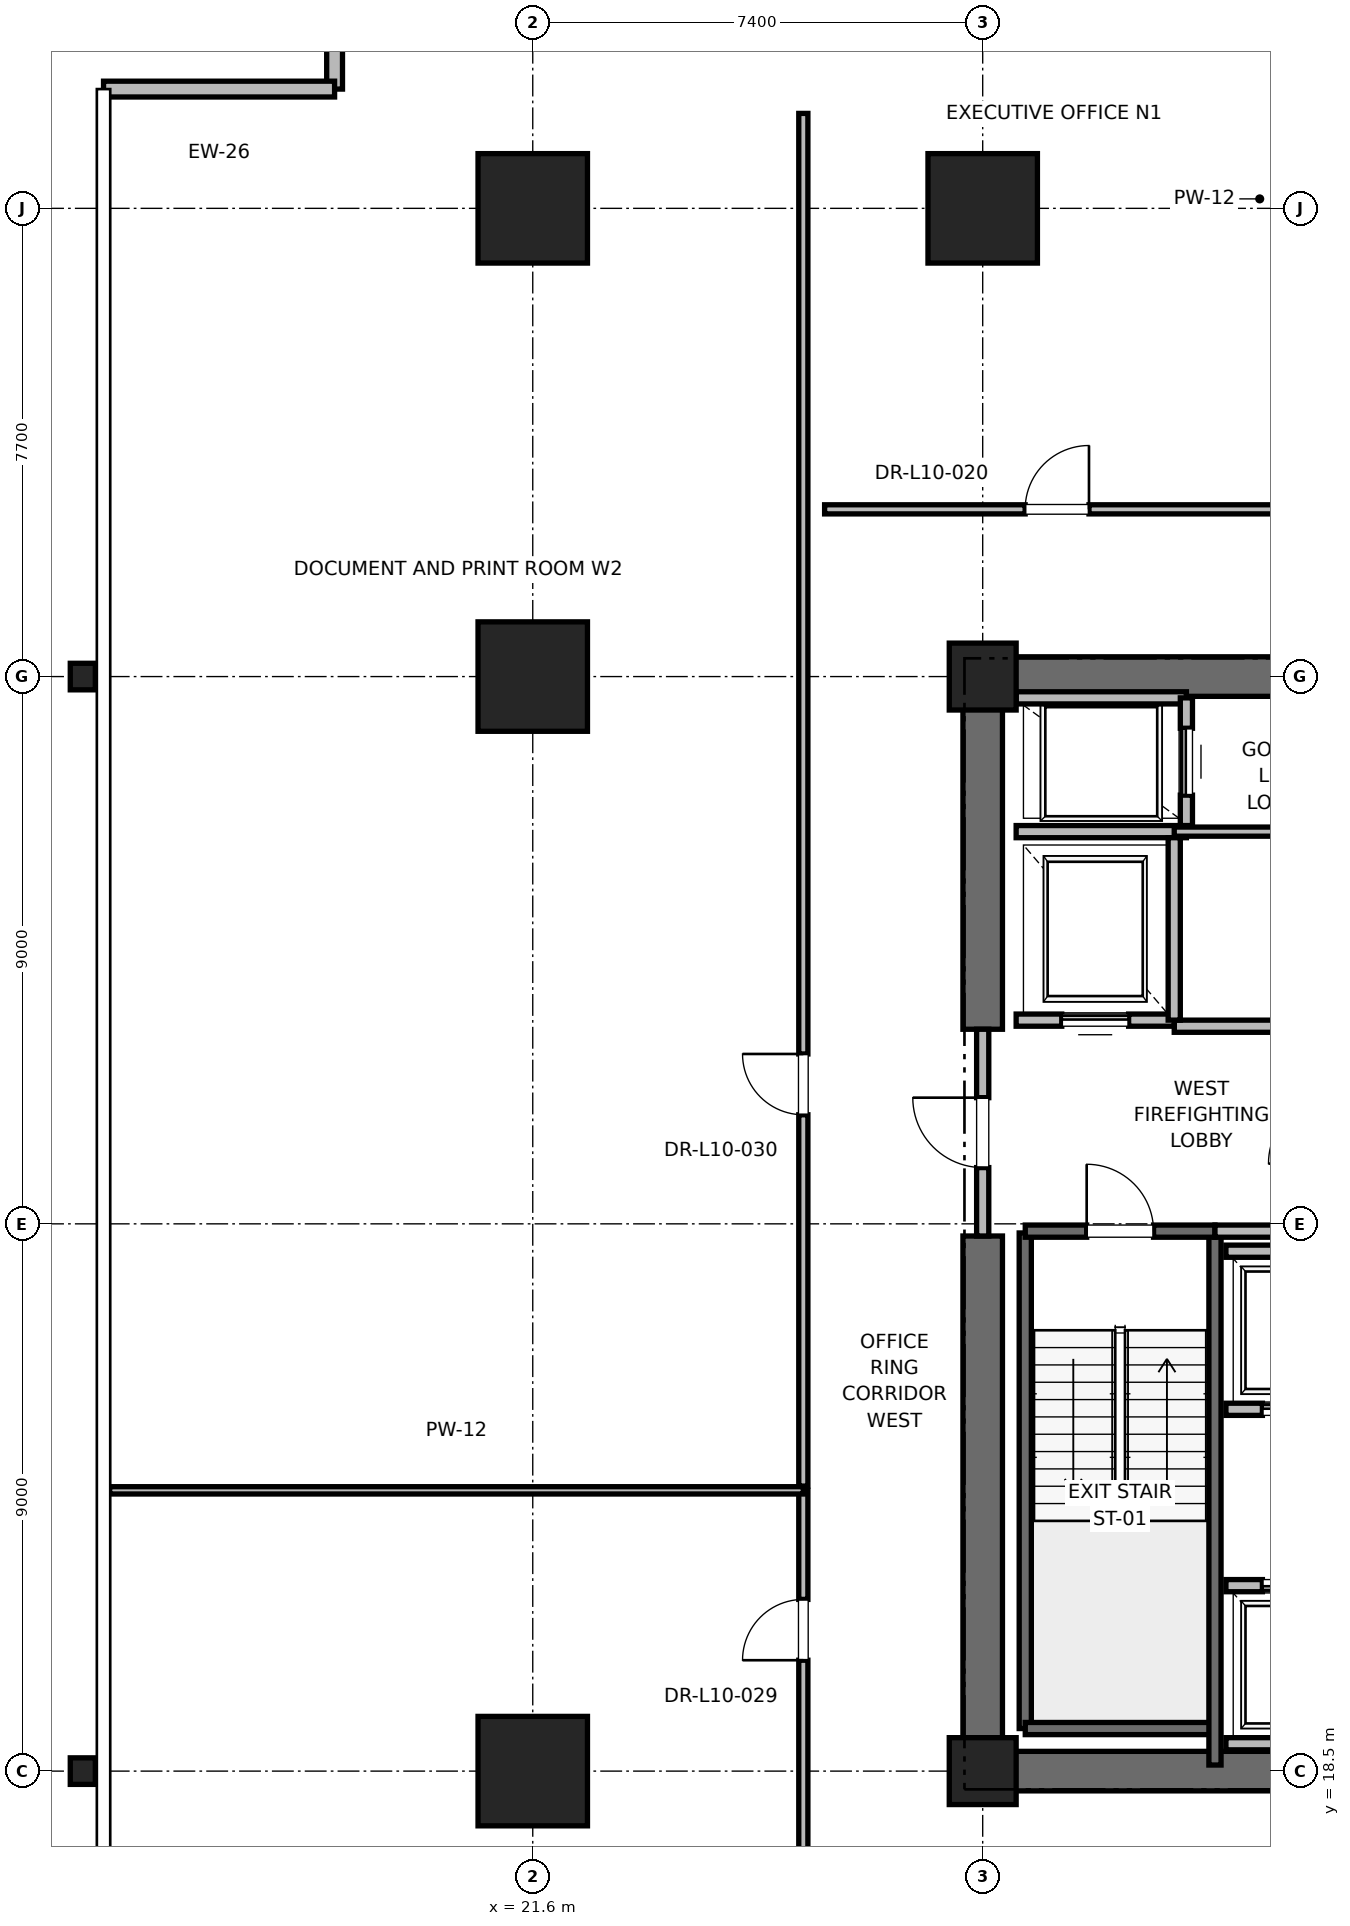
"""IFC4 building model, lengths in metres.
Left out: names, types, materials, properties, quantities, classifications, styles, units other than length and angle.
Written with IfcOpenShell. Run it as: python <this file> out.ifc"""

import sys

from ifc_helpers import new_model, si_unit, direction, frame, frame_2d, origin, origin_2d, place, context, subcontext, project, spatial, rectangle, i_section, extrude, element, fill, save


model = new_model("IFC4")
c1 = context("Model", 3, precision=1e-05, world=origin(), true_north=direction((0.0, 1.0)))
c2 = subcontext(c1, "Body", "Model", "MODEL_VIEW")
j1 = project(units=[si_unit("LENGTHUNIT", "METRE"), si_unit("PLANEANGLEUNIT", "RADIAN")], contexts=[c1])
p1 = place(None, origin())
s1 = spatial("IfcSite", under=j1, at=p1, CompositionType="ELEMENT")
p2 = place(p1, origin())
s2 = spatial("IfcBuilding", under=s1, at=p2, CompositionType="ELEMENT")
p3 = place(p2, frame((0.0, 0.0, 47.6)))
s3 = spatial("IfcBuildingStorey", under=s2, at=p3, CompositionType="ELEMENT", Elevation=47.6)
for number, where, z_axis, x_axis in (
    (1, (29.0, 44.2, 0.0), (0.0, 0.0, 1.0), (1.0, 0.0, 0.0)),
    (2, (21.6, 18.5, 0.0), (0.0, 0.0, 1.0), (1.0, 0.0, 0.0)),
    (3, (21.6, 36.5, 0.0), (0.0, 0.0, 1.0), (1.0, 0.0, 0.0)),
    (4, (21.6, 44.2, 0.0), (0.0, 0.0, 1.0), (1.0, 0.0, 0.0)),
):
    element("IfcColumn", number, at=place(p3, frame(where, z_axis=z_axis, x_axis=x_axis)), inside=s3, PredefinedType="COLUMN", context=c2, shape_type="SweptSolid", body=[
        extrude(rectangle(XDim=1.8, YDim=1.8, at=origin_2d()), origin(), (0.0, 0.0, 1.0), 4.0),
    ])
for number, where, z_axis, x_axis in (
    (5, (14.2, 18.5, 0.0), (0.0, 0.0, 1.0), (1.0, 0.0, 0.0)),
    (6, (14.2, 36.5, 0.0), (0.0, 0.0, 1.0), (1.0, 0.0, 0.0)),
):
    element("IfcColumn", number, at=place(p3, frame(where, z_axis=z_axis, x_axis=x_axis)), inside=s3, PredefinedType="COLUMN", context=c2, shape_type="SweptSolid", body=[
        extrude(i_section(OverallWidth=0.412, OverallDepth=0.437, WebThickness=0.036, FlangeThickness=0.058, FilletRadius=0.015, at=origin_2d()), origin(), (0.0, 0.0, 1.0), 4.0),
    ])
for number, where, z_axis, x_axis in (
    (7, (29.0, 18.5, 0.0), (0.0, 0.0, 1.0), (1.0, 0.0, 0.0)),
    (8, (29.0, 36.5, 0.0), (0.0, 0.0, 1.0), (1.0, 0.0, 0.0)),
):
    element("IfcColumn", number, at=place(p3, frame(where, z_axis=z_axis, x_axis=x_axis)), inside=s3, PredefinedType="PILASTER", context=c2, shape_type="SweptSolid", body=[
        extrude(rectangle(XDim=1.1, YDim=1.1, at=origin_2d()), origin(), (0.0, 0.0, 1.0), 4.0),
    ])
p4 = place(p3, frame((29.0, 18.5, 0.0), z_axis=(0.0, 0.0, 1.0), x_axis=(1.0, 0.0, 0.0)))
e9 = element("IfcWall", 9, at=p4, inside=s3, PredefinedType="SHEAR", context=c2, shape_type="SweptSolid", body=[
    extrude(rectangle(XDim=9.2, YDim=0.65, at=frame_2d((4.6, 0.0))), origin(), (0.0, 0.0, 1.0), 3.76),
])
p5 = place(p3, frame((29.0, 36.5, 0.0), z_axis=(0.0, 0.0, 1.0), x_axis=(1.0, 0.0, 0.0)))
e10 = element("IfcWall", 10, at=p5, inside=s3, PredefinedType="SHEAR", context=c2, shape_type="SweptSolid", body=[
    extrude(rectangle(XDim=5.8, YDim=0.65, at=frame_2d((2.9, 0.0))), origin(), (0.0, 0.0, 1.0), 3.76),
])
p6 = place(p3, frame((29.0, 18.5, 0.0), z_axis=(0.0, 0.0, 1.0), x_axis=(0.0, 1.0, 0.0)))
e11 = element("IfcWall", 11, at=p6, inside=s3, PredefinedType="SHEAR", context=c2, shape_type="SweptSolid", body=[
    extrude(rectangle(XDim=8.8, YDim=0.65, at=frame_2d((4.4, 0.0))), origin(), (0.0, 0.0, 1.0), 3.76),
])
p7 = place(p3, frame((29.0, 30.7, 0.0), z_axis=(0.0, 0.0, 1.0), x_axis=(0.0, 1.0, 0.0)))
e12 = element("IfcWall", 12, at=p7, inside=s3, PredefinedType="SHEAR", context=c2, shape_type="SweptSolid", body=[
    extrude(rectangle(XDim=5.8, YDim=0.65, at=frame_2d((2.9, 0.0))), origin(), (0.0, 0.0, 1.0), 3.76),
])
p8 = place(p3, frame((18.341, 49.561, 0.0), z_axis=(0.0, 0.0, 1.0), x_axis=(0.0, -1.0, 0.0)))
e13 = element("IfcWall", 13, at=p8, inside=s3, PredefinedType="PARAPET", context=c2, shape_type="SweptSolid", body=[
    extrude(rectangle(XDim=3.4, YDim=0.26, at=frame_2d((1.7, 0.0))), origin(), (0.0, 0.0, 1.0), 3.76),
])
p9 = place(p8, frame((0.8, 0.0, 0.85)))
e14 = element("IfcOpeningElement", 14, at=p9, cuts=e13, PredefinedType="OPENING", context=c2, shape_type="SweptSolid", body=[
    extrude(rectangle(XDim=1.8, YDim=2.2, at=frame_2d((0.9, 1.1))), frame((0.0, 0.13, 0.0), z_axis=(0.0, -1.0, 0.0), x_axis=(1.0, 0.0, 0.0)), (0.0, 0.0, 1.0), 0.26),
])
p10 = place(p3, frame((18.341, 46.161, 0.0), z_axis=(0.0, 0.0, 1.0), x_axis=(-1.0, 0.0, 0.0)))
e15 = element("IfcWall", 15, at=p10, inside=s3, PredefinedType="PARAPET", context=c2, shape_type="SweptSolid", body=[
    extrude(rectangle(XDim=3.8, YDim=0.26, at=frame_2d((1.9, 0.0))), origin(), (0.0, 0.0, 1.0), 3.76),
])
p11 = place(p3, frame((29.7, 19.2, 0.0), z_axis=(0.0, 0.0, 1.0), x_axis=(0.0, 1.0, 0.0)))
e16 = element("IfcWall", 16, at=p11, inside=s3, PredefinedType="SOLIDWALL", context=c2, shape_type="SweptSolid", body=[
    extrude(rectangle(XDim=8.15, YDim=0.2, at=frame_2d((4.075, 0.0))), origin(), (0.0, 0.0, 1.0), 3.76),
])
p12 = place(p3, frame((29.7, 19.2, 0.0), z_axis=(0.0, 0.0, 1.0), x_axis=(1.0, 0.0, 0.0)))
e17 = element("IfcWall", 17, at=p12, inside=s3, PredefinedType="SOLIDWALL", context=c2, shape_type="SweptSolid", body=[
    extrude(rectangle(XDim=3.12, YDim=0.2, at=frame_2d((1.56, 0.0))), origin(), (0.0, 0.0, 1.0), 3.76),
])
p13 = place(p3, frame((32.82, 18.6, 0.0), z_axis=(0.0, 0.0, 1.0), x_axis=(0.0, 1.0, 0.0)))
e18 = element("IfcWall", 18, at=p13, inside=s3, PredefinedType="SOLIDWALL", context=c2, shape_type="SweptSolid", body=[
    extrude(rectangle(XDim=8.78, YDim=0.2, at=frame_2d((4.39, 0.0))), origin(), (0.0, 0.0, 1.0), 3.76),
])
p14 = place(p3, frame((29.7, 27.38, 0.0), z_axis=(0.0, 0.0, 1.0), x_axis=(1.0, 0.0, 0.0)))
e19 = element("IfcWall", 19, at=p14, inside=s3, PredefinedType="SOLIDWALL", context=c2, shape_type="SweptSolid", body=[
    extrude(rectangle(XDim=3.12, YDim=0.2, at=frame_2d((1.56, 0.0))), origin(), (0.0, 0.0, 1.0), 3.76),
])
p15 = place(p14, frame((1.01, 0.0, 0.0)))
e20 = element("IfcOpeningElement", 20, at=p15, cuts=e19, PredefinedType="OPENING", context=c2, shape_type="SweptSolid", body=[
    extrude(rectangle(XDim=1.1, YDim=2.15, at=frame_2d((0.55, 1.075))), frame((0.0, 0.1, 0.0), z_axis=(0.0, -1.0, 0.0), x_axis=(1.0, 0.0, 0.0)), (0.0, 0.0, 1.0), 0.2),
])
p16 = place(p3, frame((29.0, 27.3, 0.0), z_axis=(0.0, 0.0, 1.0), x_axis=(0.0, 1.0, 0.0)))
e21 = element("IfcWall", 21, at=p16, inside=s3, PredefinedType="PARTITIONING", context=c2, shape_type="SweptSolid", body=[
    extrude(rectangle(XDim=3.4, YDim=0.2, at=frame_2d((1.7, 0.0))), origin(), (0.0, 0.0, 1.0), 2.54),
])
p17 = place(p16, frame((1.125, 0.0, 0.0)))
e22 = element("IfcOpeningElement", 22, at=p17, cuts=e21, PredefinedType="OPENING", context=c2, shape_type="SweptSolid", body=[
    extrude(rectangle(XDim=1.15, YDim=2.2, at=frame_2d((0.575, 1.1))), frame((0.0, 0.1, 0.0), z_axis=(0.0, -1.0, 0.0), x_axis=(1.0, 0.0, 0.0)), (0.0, 0.0, 1.0), 0.2),
])
p18 = place(p3, frame((32.82, 27.38, 0.0), z_axis=(0.0, 0.0, 1.0), x_axis=(1.0, 0.0, 0.0)))
e23 = element("IfcWall", 23, at=p18, inside=s3, PredefinedType="PARTITIONING", context=c2, shape_type="SweptSolid", body=[
    extrude(rectangle(XDim=5.62, YDim=0.2, at=frame_2d((2.81, 0.0))), origin(), (0.0, 0.0, 1.0), 3.76),
])
p19 = place(p3, frame((32.15, 30.75, 0.0), z_axis=(0.0, 0.0, 1.0), x_axis=(1.0, 0.0, 0.0)))
e24 = element("IfcWall", 24, at=p19, inside=s3, PredefinedType="PARTITIONING", context=c2, shape_type="SweptSolid", body=[
    extrude(rectangle(XDim=3.13, YDim=0.2, at=frame_2d((1.565, 0.0))), origin(), (0.0, 0.0, 1.0), 3.76),
])
p20 = place(p3, frame((29.55, 30.85, 0.0), z_axis=(0.0, 0.0, 1.0), x_axis=(1.0, 0.0, 0.0)))
e25 = element("IfcWall", 25, at=p20, inside=s3, PredefinedType="SOLIDWALL", context=c2, shape_type="SweptSolid", body=[
    extrude(rectangle(XDim=2.6, YDim=0.2, at=frame_2d((1.3, 0.0))), origin(), (0.0, 0.0, 1.0), 2.54),
])
p21 = place(p20, frame((0.75, 0.0, 0.0)))
e26 = element("IfcOpeningElement", 26, at=p21, cuts=e25, PredefinedType="OPENING", context=c2, shape_type="SweptSolid", body=[
    extrude(rectangle(XDim=1.1, YDim=2.2, at=frame_2d((0.55, 1.1))), frame((0.0, 0.1, 0.0), z_axis=(0.0, -1.0, 0.0), x_axis=(1.0, 0.0, 0.0)), (0.0, 0.0, 1.0), 0.2),
])
p22 = place(p3, frame((29.55, 33.95, 0.0), z_axis=(0.0, 0.0, 1.0), x_axis=(1.0, 0.0, 0.0)))
e27 = element("IfcWall", 27, at=p22, inside=s3, PredefinedType="SOLIDWALL", context=c2, shape_type="SweptSolid", body=[
    extrude(rectangle(XDim=2.8, YDim=0.2, at=frame_2d((1.4, 0.0))), origin(), (0.0, 0.0, 1.0), 3.76),
])
p23 = place(p3, frame((32.15, 30.85, 0.0), z_axis=(0.0, 0.0, 1.0), x_axis=(0.0, 1.0, 0.0)))
e28 = element("IfcWall", 28, at=p23, inside=s3, PredefinedType="SOLIDWALL", context=c2, shape_type="SweptSolid", body=[
    extrude(rectangle(XDim=3.0, YDim=0.2, at=frame_2d((1.5, 0.0))), origin(), (0.0, 0.0, 1.0), 3.76),
])
p24 = place(p3, frame((32.35, 36.15, 0.0), z_axis=(0.0, 0.0, 1.0), x_axis=(-1.0, 0.0, 0.0)))
e29 = element("IfcWall", 29, at=p24, inside=s3, PredefinedType="SOLIDWALL", context=c2, shape_type="SweptSolid", body=[
    extrude(rectangle(XDim=2.8, YDim=0.2, at=frame_2d((1.4, 0.0))), origin(), (0.0, 0.0, 1.0), 2.889),
])
p25 = place(p3, frame((32.35, 34.05, 0.0), z_axis=(0.0, 0.0, 1.0), x_axis=(0.0, 1.0, 0.0)))
e30 = element("IfcWall", 30, at=p25, inside=s3, PredefinedType="SOLIDWALL", context=c2, shape_type="SweptSolid", body=[
    extrude(rectangle(XDim=2.1, YDim=0.2, at=frame_2d((1.05, 0.0))), origin(), (0.0, 0.0, 1.0), 3.76),
])
p26 = place(p25, frame((0.5, 0.0, 0.0)))
e31 = element("IfcOpeningElement", 31, at=p26, cuts=e30, PredefinedType="OPENING", context=c2, shape_type="SweptSolid", body=[
    extrude(rectangle(XDim=1.1, YDim=2.2, at=frame_2d((0.55, 1.1))), frame((0.0, 0.1, 0.0), z_axis=(0.0, -1.0, 0.0), x_axis=(1.0, 0.0, 0.0)), (0.0, 0.0, 1.0), 0.2),
])
p27 = place(p3, frame((33.0, 18.95, 0.0), z_axis=(0.0, 0.0, 1.0), x_axis=(1.0, 0.0, 0.0)))
e32 = element("IfcWall", 32, at=p27, inside=s3, PredefinedType="SOLIDWALL", context=c2, shape_type="SweptSolid", body=[
    extrude(rectangle(XDim=2.3, YDim=0.2, at=frame_2d((1.15, 0.0))), origin(), (0.0, 0.0, 1.0), 3.76),
])
p28 = place(p3, frame((35.3, 21.55, 0.0), z_axis=(0.0, 0.0, 1.0), x_axis=(-1.0, 0.0, 0.0)))
e33 = element("IfcWall", 33, at=p28, inside=s3, PredefinedType="SOLIDWALL", context=c2, shape_type="SweptSolid", body=[
    extrude(rectangle(XDim=2.3, YDim=0.2, at=frame_2d((1.15, 0.0))), origin(), (0.0, 0.0, 1.0), 3.76),
])
p29 = place(p28, frame((0.6, 0.0, 0.0)))
e34 = element("IfcOpeningElement", 34, at=p29, cuts=e33, PredefinedType="OPENING", context=c2, shape_type="SweptSolid", body=[
    extrude(rectangle(XDim=1.1, YDim=2.2, at=frame_2d((0.55, 1.1))), frame((0.0, 0.1, 0.0), z_axis=(0.0, -1.0, 0.0), x_axis=(1.0, 0.0, 0.0)), (0.0, 0.0, 1.0), 0.2),
])
p30 = place(p3, frame((33.0, 24.45, 0.0), z_axis=(0.0, 0.0, 1.0), x_axis=(1.0, 0.0, 0.0)))
e35 = element("IfcWall", 35, at=p30, inside=s3, PredefinedType="SOLIDWALL", context=c2, shape_type="SweptSolid", body=[
    extrude(rectangle(XDim=2.3, YDim=0.2, at=frame_2d((1.15, 0.0))), origin(), (0.0, 0.0, 1.0), 3.76),
])
p31 = place(p30, frame((0.6, 0.0, 0.0)))
e36 = element("IfcOpeningElement", 36, at=p31, cuts=e35, PredefinedType="OPENING", context=c2, shape_type="SweptSolid", body=[
    extrude(rectangle(XDim=1.1, YDim=2.2, at=frame_2d((0.55, 1.1))), frame((0.0, 0.1, 0.0), z_axis=(0.0, -1.0, 0.0), x_axis=(1.0, 0.0, 0.0)), (0.0, 0.0, 1.0), 0.2),
])
p32 = place(p3, frame((35.3, 27.05, 0.0), z_axis=(0.0, 0.0, 1.0), x_axis=(-1.0, 0.0, 0.0)))
e37 = element("IfcWall", 37, at=p32, inside=s3, PredefinedType="SOLIDWALL", context=c2, shape_type="SweptSolid", body=[
    extrude(rectangle(XDim=2.3, YDim=0.2, at=frame_2d((1.15, 0.0))), origin(), (0.0, 0.0, 1.0), 3.76),
])
p33 = place(p3, frame((32.15, 33.95, 0.0), z_axis=(0.0, 0.0, 1.0), x_axis=(1.0, 0.0, 0.0)))
e38 = element("IfcWall", 38, at=p33, inside=s3, PredefinedType="PARTITIONING", context=c2, shape_type="SweptSolid", body=[
    extrude(rectangle(XDim=3.13, YDim=0.15, at=frame_2d((1.565, 0.0))), origin(), (0.0, 0.0, 1.0), 2.85),
])
p34 = place(p3, frame((26.4, 39.25, 0.0), z_axis=(0.0, 0.0, 1.0), x_axis=(1.0, 0.0, 0.0)))
e39 = element("IfcWall", 39, at=p34, inside=s3, PredefinedType="PARTITIONING", context=c2, shape_type="SweptSolid", body=[
    extrude(rectangle(XDim=7.616, YDim=0.15, at=frame_2d((3.808, 0.0))), origin(), (0.0, 0.0, 1.0), 2.85),
])
p35 = place(p34, frame((3.298, 0.0, 0.0)))
e40 = element("IfcOpeningElement", 40, at=p35, cuts=e39, PredefinedType="OPENING", context=c2, shape_type="SweptSolid", body=[
    extrude(rectangle(XDim=1.05, YDim=2.2, at=frame_2d((0.525, 1.1))), frame((0.0, 0.075, 0.0), z_axis=(0.0, -1.0, 0.0), x_axis=(1.0, 0.0, 0.0)), (0.0, 0.0, 1.0), 0.15),
])
p36 = place(p3, frame((26.05, 9.239, 0.0), z_axis=(0.0, 0.0, 1.0), x_axis=(0.0, 1.0, 0.0)))
e41 = element("IfcWall", 41, at=p36, inside=s3, PredefinedType="PARTITIONING", context=c2, shape_type="SweptSolid", body=[
    extrude(rectangle(XDim=13.878, YDim=0.15, at=frame_2d((6.939, 0.0))), origin(), (0.0, 0.0, 1.0), 2.85),
])
p37 = place(p36, frame((11.085, 0.0, 0.0)))
e42 = element("IfcOpeningElement", 42, at=p37, cuts=e41, PredefinedType="OPENING", context=c2, shape_type="SweptSolid", body=[
    extrude(rectangle(XDim=1.0, YDim=2.15, at=frame_2d((0.5, 1.075))), frame((0.0, 0.075, 0.0), z_axis=(0.0, -1.0, 0.0), x_axis=(1.0, 0.0, 0.0)), (0.0, 0.0, 1.0), 0.15),
])
p38 = place(p3, frame((14.641, 23.117, 0.0), z_axis=(0.0, 0.0, 1.0), x_axis=(1.0, 0.0, 0.0)))
e43 = element("IfcWall", 43, at=p38, inside=s3, PredefinedType="PARTITIONING", context=c2, shape_type="SweptSolid", body=[
    extrude(rectangle(XDim=11.409, YDim=0.12, at=frame_2d((5.705, 0.0))), origin(), (0.0, 0.0, 1.0), 2.85),
])
p39 = place(p3, frame((26.05, 23.187, 0.0), z_axis=(0.0, 0.0, 1.0), x_axis=(0.0, 1.0, 0.0)))
e44 = element("IfcWall", 44, at=p39, inside=s3, PredefinedType="PARTITIONING", context=c2, shape_type="SweptSolid", body=[
    extrude(rectangle(XDim=22.574, YDim=0.15, at=frame_2d((11.287, 0.0))), origin(), (0.0, 0.0, 1.0), 2.85),
])
p40 = place(p39, frame((6.106, 0.0, 0.0)))
e45 = element("IfcOpeningElement", 45, at=p40, cuts=e44, PredefinedType="OPENING", context=c2, shape_type="SweptSolid", body=[
    extrude(rectangle(XDim=1.0, YDim=2.15, at=frame_2d((0.5, 1.075))), frame((0.0, 0.075, 0.0), z_axis=(0.0, -1.0, 0.0), x_axis=(1.0, 0.0, 0.0)), (0.0, 0.0, 1.0), 0.15),
])
p41 = place(p15, origin())
e46 = element("IfcDoor", 46, at=p41, inside=s3, OperationType="SINGLE_SWING_LEFT", PredefinedType="DOOR", context=c2, shape_type="SweptSolid", body=[
    extrude(rectangle(XDim=1.1, YDim=2.15, at=frame_2d((0.55, 1.075))), frame((0.0, 0.025, 0.0), z_axis=(0.0, -1.0, 0.0), x_axis=(1.0, 0.0, 0.0)), (0.0, 0.0, 1.0), 0.05),
])
fill(e20, e46)
p42 = place(p17, origin())
e47 = element("IfcDoor", 47, at=p42, inside=s3, OperationType="SINGLE_SWING_RIGHT", PredefinedType="DOOR", context=c2, shape_type="SweptSolid", body=[
    extrude(rectangle(XDim=1.15, YDim=2.2, at=frame_2d((0.575, 1.1))), frame((0.0, 0.025, 0.0), z_axis=(0.0, -1.0, 0.0), x_axis=(1.0, 0.0, 0.0)), (0.0, 0.0, 1.0), 0.05),
])
fill(e22, e47)
p43 = place(p21, origin())
e48 = element("IfcDoor", 48, at=p43, inside=s3, OperationType="SLIDING_TO_RIGHT", PredefinedType="DOOR", context=c2, shape_type="SweptSolid", body=[
    extrude(rectangle(XDim=1.1, YDim=2.2, at=frame_2d((0.55, 1.1))), frame((0.0, 0.025, 0.0), z_axis=(0.0, -1.0, 0.0), x_axis=(1.0, 0.0, 0.0)), (0.0, 0.0, 1.0), 0.05),
])
fill(e26, e48)
p44 = place(p26, origin())
e49 = element("IfcDoor", 49, at=p44, inside=s3, OperationType="SLIDING_TO_RIGHT", PredefinedType="DOOR", context=c2, shape_type="SweptSolid", body=[
    extrude(rectangle(XDim=1.1, YDim=2.2, at=frame_2d((0.55, 1.1))), frame((0.0, 0.025, 0.0), z_axis=(0.0, -1.0, 0.0), x_axis=(1.0, 0.0, 0.0)), (0.0, 0.0, 1.0), 0.05),
])
fill(e31, e49)
p45 = place(p29, origin())
e50 = element("IfcDoor", 50, at=p45, inside=s3, OperationType="SLIDING_TO_RIGHT", PredefinedType="DOOR", context=c2, shape_type="SweptSolid", body=[
    extrude(rectangle(XDim=1.1, YDim=2.2, at=frame_2d((0.55, 1.1))), frame((0.0, 0.025, 0.0), z_axis=(0.0, -1.0, 0.0), x_axis=(1.0, 0.0, 0.0)), (0.0, 0.0, 1.0), 0.05),
])
fill(e34, e50)
p46 = place(p31, origin())
e51 = element("IfcDoor", 51, at=p46, inside=s3, OperationType="SLIDING_TO_RIGHT", PredefinedType="DOOR", context=c2, shape_type="SweptSolid", body=[
    extrude(rectangle(XDim=1.1, YDim=2.2, at=frame_2d((0.55, 1.1))), frame((0.0, 0.025, 0.0), z_axis=(0.0, -1.0, 0.0), x_axis=(1.0, 0.0, 0.0)), (0.0, 0.0, 1.0), 0.05),
])
fill(e36, e51)
p47 = place(p35, origin())
e52 = element("IfcDoor", 52, at=p47, inside=s3, OperationType="SINGLE_SWING_RIGHT", PredefinedType="DOOR", context=c2, shape_type="SweptSolid", body=[
    extrude(rectangle(XDim=1.05, YDim=2.2, at=frame_2d((0.525, 1.1))), frame((0.0, 0.025, 0.0), z_axis=(0.0, -1.0, 0.0), x_axis=(1.0, 0.0, 0.0)), (0.0, 0.0, 1.0), 0.05),
])
fill(e40, e52)
p48 = place(p37, origin())
e53 = element("IfcDoor", 53, at=p48, inside=s3, OperationType="SINGLE_SWING_LEFT", PredefinedType="DOOR", context=c2, shape_type="SweptSolid", body=[
    extrude(rectangle(XDim=1.0, YDim=2.15, at=frame_2d((0.5, 1.075))), frame((0.0, 0.025, 0.0), z_axis=(0.0, -1.0, 0.0), x_axis=(1.0, 0.0, 0.0)), (0.0, 0.0, 1.0), 0.05),
])
fill(e42, e53)
p49 = place(p40, origin())
e54 = element("IfcDoor", 54, at=p49, inside=s3, OperationType="SINGLE_SWING_RIGHT", PredefinedType="DOOR", context=c2, shape_type="SweptSolid", body=[
    extrude(rectangle(XDim=1.0, YDim=2.15, at=frame_2d((0.5, 1.075))), frame((0.0, 0.025, 0.0), z_axis=(0.0, -1.0, 0.0), x_axis=(1.0, 0.0, 0.0)), (0.0, 0.0, 1.0), 0.05),
])
fill(e45, e54)
save(model, sys.argv[1])
